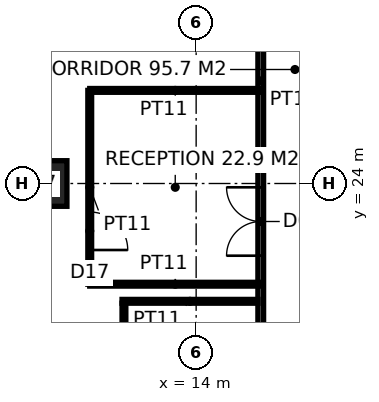
"""IFC4 building model, lengths in metres.
Left out: names, types, materials, properties, quantities, classifications, styles, units other than length and angle.
Written with IfcOpenShell. Run it as: python <this file> out.ifc"""

import sys

from ifc_helpers import new_model, si_unit, direction, frame, frame_2d, origin, origin_2d, place, context, subcontext, project, spatial, rectangle, hollow_rectangle, extrude, element, fill, save


model = new_model("IFC4")
c1 = context("Model", 3, precision=1e-05, world=origin(), true_north=direction((0.0, 1.0)))
c2 = subcontext(c1, "Body", "Model", "MODEL_VIEW")
j1 = project(units=[si_unit("LENGTHUNIT", "METRE"), si_unit("PLANEANGLEUNIT", "RADIAN")], contexts=[c1])
p1 = place(None, origin())
s1 = spatial("IfcSite", under=j1, at=p1, CompositionType="ELEMENT")
p2 = place(p1, origin())
s2 = spatial("IfcBuilding", under=s1, at=p2, CompositionType="ELEMENT")
p3 = place(p2, frame((0.0, 0.0, 63.0)))
s3 = spatial("IfcBuildingStorey", under=s2, at=p3, CompositionType="ELEMENT", Elevation=63.0)
p4 = place(p3, frame((10.0, 24.0, 0.0), z_axis=(0.0, 0.0, 1.0), x_axis=(1.0, 0.0, 0.0)))
e1 = element("IfcColumn", 1, at=p4, inside=s3, PredefinedType="COLUMN", context=c2, shape_type="SweptSolid", body=[
    extrude(hollow_rectangle(XDim=1.2, YDim=1.2, WallThickness=0.1, at=origin_2d()), origin(), (0.0, 0.0, 1.0), 4.0),
])
p5 = place(p3, frame((15.7, 14.625, 0.0), z_axis=(0.0, 0.0, 1.0), x_axis=(0.0, 1.0, 0.0)))
e2 = element("IfcWall", 2, at=p5, inside=s3, PredefinedType="PARTITIONING", context=c2, shape_type="SweptSolid", body=[
    extrude(rectangle(XDim=24.15, YDim=0.15, at=frame_2d((12.075, 0.0))), origin(), (0.0, 0.0, 1.0), 3.85),
])
p6 = place(p5, frame((7.475, 0.0, 0.0)))
e3 = element("IfcOpeningElement", 3, at=p6, cuts=e2, PredefinedType="OPENING", context=c2, shape_type="SweptSolid", body=[
    extrude(rectangle(XDim=1.8, YDim=2.4, at=frame_2d((0.9, 1.2))), frame((0.0, 0.085, 0.0), z_axis=(0.0, -1.0, 0.0), x_axis=(1.0, 0.0, 0.0)), (0.0, 0.0, 1.0), 0.17),
])
p7 = place(p5, frame((19.425, 0.0, 0.0)))
e4 = element("IfcOpeningElement", 4, at=p7, cuts=e2, PredefinedType="OPENING", context=c2, shape_type="SweptSolid", body=[
    extrude(rectangle(XDim=1.8, YDim=2.4, at=frame_2d((0.9, 1.2))), frame((0.0, 0.085, 0.0), z_axis=(0.0, -1.0, 0.0), x_axis=(1.0, 0.0, 0.0)), (0.0, 0.0, 1.0), 0.17),
])
p8 = place(p3, frame((12.05, 20.9, 0.0), z_axis=(0.0, 0.0, 1.0), x_axis=(1.0, 0.0, 0.0)))
e5 = element("IfcWall", 5, at=p8, inside=s3, PredefinedType="PARTITIONING", context=c2, shape_type="SweptSolid", body=[
    extrude(rectangle(XDim=3.575, YDim=0.1, at=frame_2d((1.788, 0.0))), origin(), (0.0, 0.0, 1.0), 3.85),
])
p9 = place(p3, frame((12.1, 15.75, 0.0), z_axis=(0.0, 0.0, 1.0), x_axis=(0.0, 1.0, 0.0)))
e6 = element("IfcWall", 6, at=p9, inside=s3, PredefinedType="PARTITIONING", context=c2, shape_type="SweptSolid", body=[
    extrude(rectangle(XDim=5.1, YDim=0.1, at=frame_2d((2.55, 0.0))), origin(), (0.0, 0.0, 1.0), 3.85),
])
p10 = place(p9, frame((2.05, 0.0, 0.0)))
e7 = element("IfcOpeningElement", 7, at=p10, cuts=e6, PredefinedType="OPENING", context=c2, shape_type="SweptSolid", body=[
    extrude(rectangle(XDim=1.0, YDim=2.2, at=frame_2d((0.5, 1.1))), frame((0.0, 0.06, 0.0), z_axis=(0.0, -1.0, 0.0), x_axis=(1.0, 0.0, 0.0)), (0.0, 0.0, 1.0), 0.12),
])
p11 = place(p3, frame((15.7, 26.45, 0.0), z_axis=(0.0, 0.0, 1.0), x_axis=(-1.0, 0.0, 0.0)))
e8 = element("IfcWall", 8, at=p11, inside=s3, PredefinedType="PARTITIONING", context=c2, shape_type="SweptSolid", body=[
    extrude(rectangle(XDim=4.5, YDim=0.1, at=frame_2d((2.25, 0.0))), origin(), (0.0, 0.0, 1.0), 3.85),
])
p12 = place(p3, frame((11.2, 26.45, 0.0), z_axis=(0.0, 0.0, 1.0), x_axis=(0.0, -1.0, 0.0)))
e9 = element("IfcWall", 9, at=p12, inside=s3, PredefinedType="PARTITIONING", context=c2, shape_type="SweptSolid", body=[
    extrude(rectangle(XDim=5.1, YDim=0.1, at=frame_2d((2.55, 0.0))), origin(), (0.0, 0.0, 1.0), 3.85),
])
p13 = place(p12, frame((3.2, 0.0, 0.0)))
e10 = element("IfcOpeningElement", 10, at=p13, cuts=e9, PredefinedType="OPENING", context=c2, shape_type="SweptSolid", body=[
    extrude(rectangle(XDim=1.0, YDim=2.2, at=frame_2d((0.5, 1.1))), frame((0.0, 0.06, 0.0), z_axis=(0.0, -1.0, 0.0), x_axis=(1.0, 0.0, 0.0)), (0.0, 0.0, 1.0), 0.12),
])
p14 = place(p3, frame((11.2, 21.35, 0.0), z_axis=(0.0, 0.0, 1.0), x_axis=(1.0, 0.0, 0.0)))
e11 = element("IfcWall", 11, at=p14, inside=s3, PredefinedType="PARTITIONING", context=c2, shape_type="SweptSolid", body=[
    extrude(rectangle(XDim=4.5, YDim=0.1, at=frame_2d((2.25, 0.0))), origin(), (0.0, 0.0, 1.0), 3.85),
])
p15 = place(p6, origin())
e12 = element("IfcDoor", 12, at=p15, inside=s3, OperationType="DOUBLE_DOOR_DOUBLE_SWING", PredefinedType="DOOR", context=c2, shape_type="SweptSolid", body=[
    extrude(rectangle(XDim=1.8, YDim=2.4, at=frame_2d((0.9, 1.2))), frame((0.0, 0.025, 0.0), z_axis=(0.0, -1.0, 0.0), x_axis=(1.0, 0.0, 0.0)), (0.0, 0.0, 1.0), 0.05),
])
fill(e3, e12)
p16 = place(p13, origin())
e13 = element("IfcDoor", 13, at=p16, inside=s3, OperationType="SINGLE_SWING_RIGHT", PredefinedType="DOOR", context=c2, shape_type="SweptSolid", body=[
    extrude(rectangle(XDim=1.0, YDim=2.2, at=frame_2d((0.5, 1.1))), frame((0.0, 0.025, 0.0), z_axis=(0.0, -1.0, 0.0), x_axis=(1.0, 0.0, 0.0)), (0.0, 0.0, 1.0), 0.05),
])
fill(e10, e13)
save(model, sys.argv[1])
